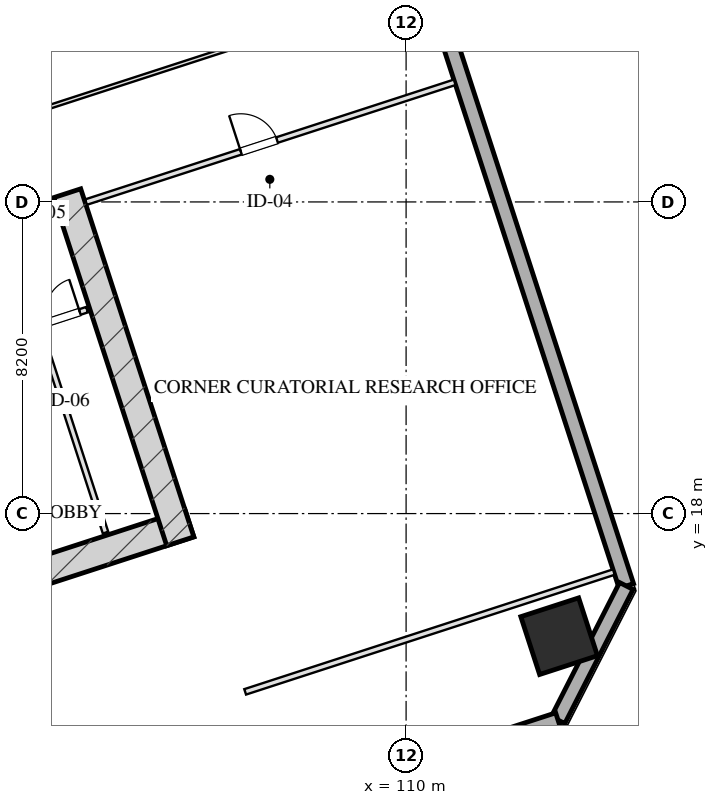
"""IFC4 building model, lengths in metres.
Left out: names, types, materials, properties, quantities, classifications, styles, units other than length and angle.
Written with IfcOpenShell. Run it as: python <this file> out.ifc"""

import sys

from ifc_helpers import new_model, si_unit, direction, frame, frame_2d, origin, origin_2d, place, context, subcontext, project, spatial, rectangle, hollow_rectangle, extrude, element, fill, save


model = new_model("IFC4")
c1 = context("Model", 3, precision=1e-05, world=origin(), true_north=direction((0.0, 1.0)))
c2 = subcontext(c1, "Body", "Model", "MODEL_VIEW")
j1 = project(units=[si_unit("LENGTHUNIT", "METRE"), si_unit("PLANEANGLEUNIT", "RADIAN")], contexts=[c1])
p1 = place(None, origin())
s1 = spatial("IfcSite", under=j1, at=p1, CompositionType="ELEMENT")
p2 = place(p1, origin())
s2 = spatial("IfcBuilding", under=s1, at=p2, CompositionType="ELEMENT")
p3 = place(p2, frame((0.0, 0.0, 38.0)))
s3 = spatial("IfcBuildingStorey", under=s2, at=p3, CompositionType="ELEMENT", Elevation=38.0)
p4 = place(p3, frame((88.559, 12.629, 0.0), z_axis=(0.0, 0.0, 1.0), x_axis=(0.951056072937, 0.309018358888, 0.0)))
e1 = element("IfcWall", 1, at=p4, inside=s3, PredefinedType="SHEAR", context=c2, shape_type="SweptSolid", body=[
    extrude(rectangle(XDim=16.55, YDim=0.75, at=frame_2d((8.275, 0.0))), origin(), (0.0, 0.0, 1.0), 4.0),
])
p5 = place(p3, frame((101.082, 26.429, 0.0), z_axis=(0.0, 0.0, 1.0), x_axis=(0.309016134813, -0.951056795583, 0.0)))
e2 = element("IfcWall", 2, at=p5, inside=s3, PredefinedType="SHEAR", context=c2, shape_type="SweptSolid", body=[
    extrude(rectangle(XDim=9.63, YDim=0.75, at=frame_2d((4.815, 0.0))), origin(), (0.0, 0.0, 1.0), 4.0),
])
p6 = place(p3, frame((114.027, 14.774, 0.0), z_axis=(0.0, 0.0, 1.0), x_axis=(0.951056516295, 0.309016994375, 0.0)))
e3 = element("IfcColumn", 3, at=p6, inside=s3, PredefinedType="COLUMN", context=c2, shape_type="SweptSolid", body=[
    extrude(hollow_rectangle(XDim=1.6, YDim=1.6, WallThickness=0.055, at=origin_2d()), origin(), (0.0, 0.0, 1.0), 4.001),
])
p7 = place(p3, frame((100.345, 63.648, 0.0), z_axis=(0.0, 0.0, 1.0), x_axis=(0.309014526607, -0.951057318118, 0.0)))
e4 = element("IfcWall", 4, at=p7, inside=s3, PredefinedType="SOLIDWALL", context=c2, shape_type="SweptSolid", body=[
    extrude(rectangle(XDim=50.0, YDim=0.4, at=frame_2d((25.0, 0.0))), origin(), (0.0, 0.0, 1.0), 3.16),
])
p8 = place(p7, frame((17.35, 0.0, 0.75)))
e5 = element("IfcOpeningElement", 5, at=p8, cuts=e4, PredefinedType="OPENING", context=c2, shape_type="SweptSolid", body=[
    extrude(rectangle(XDim=2.5, YDim=1.75, at=frame_2d((1.25, 0.875))), frame((0.0, 0.21, 0.0), z_axis=(0.0, -1.0, 0.0), x_axis=(1.0, 0.0, 0.0)), (0.0, 0.0, 1.0), 0.42),
])
p9 = place(p7, frame((30.25, 0.0, 0.0)))
e6 = element("IfcOpeningElement", 6, at=p9, cuts=e4, PredefinedType="OPENING", context=c2, shape_type="SweptSolid", body=[
    extrude(rectangle(XDim=1.1, YDim=2.15, at=frame_2d((0.55, 1.075))), frame((0.0, 0.21, 0.0), z_axis=(0.0, -1.0, 0.0), x_axis=(1.0, 0.0, 0.0)), (0.0, 0.0, 1.0), 0.42),
])
p10 = place(p3, frame((115.795, 16.095, 0.0), z_axis=(0.0, 0.0, 1.0), x_axis=(-0.453958106755, -0.891023028497, 0.0)))
e7 = element("IfcWall", 7, at=p10, inside=s3, PredefinedType="SOLIDWALL", context=c2, shape_type="SweptSolid", body=[
    extrude(rectangle(XDim=3.96, YDim=0.4, at=frame_2d((1.98, 0.0))), origin(), (0.0, 0.0, 1.0), 3.16),
])
p11 = place(p3, frame((113.998, 12.567, 0.0), z_axis=(0.0, 0.0, 1.0), x_axis=(-0.951055939317, -0.309018770125, 0.0)))
e8 = element("IfcWall", 8, at=p11, inside=s3, PredefinedType="SOLIDWALL", context=c2, shape_type="SweptSolid", body=[
    extrude(rectangle(XDim=32.4, YDim=0.4, at=frame_2d((16.2, 0.0))), origin(), (0.0, 0.0, 1.0), 3.16),
])
p12 = place(p3, frame((97.727, 24.944, 0.0), z_axis=(0.0, 0.0, 1.0), x_axis=(0.951036872128, 0.309077446369, 0.0)))
e9 = element("IfcWall", 9, at=p12, inside=s3, PredefinedType="PARTITIONING", context=c2, shape_type="SweptSolid", body=[
    extrude(rectangle(XDim=3.2, YDim=0.15, at=frame_2d((1.6, 0.0))), origin(), (0.0, 0.0, 1.0), 3.725),
])
p13 = place(p12, frame((0.45, 0.0, 0.0)))
e10 = element("IfcOpeningElement", 10, at=p13, cuts=e9, PredefinedType="OPENING", context=c2, shape_type="SweptSolid", body=[
    extrude(rectangle(XDim=0.95, YDim=2.05, at=frame_2d((0.475, 1.025))), frame((0.0, 0.085, 0.0), z_axis=(0.0, -1.0, 0.0), x_axis=(1.0, 0.0, 0.0)), (0.0, 0.0, 1.0), 0.17),
])
p14 = place(p3, frame((98.561, 22.376, 0.0), z_axis=(0.0, 0.0, 1.0), x_axis=(0.95104415986, 0.309055020985, 0.0)))
e11 = element("IfcWall", 11, at=p14, inside=s3, PredefinedType="PARTITIONING", context=c2, shape_type="SweptSolid", body=[
    extrude(rectangle(XDim=3.2, YDim=0.15, at=frame_2d((1.6, 0.0))), origin(), (0.0, 0.0, 1.0), 3.725),
])
p15 = place(p14, frame((0.35, 0.0, 0.0)))
e12 = element("IfcOpeningElement", 12, at=p15, cuts=e11, PredefinedType="OPENING", context=c2, shape_type="SweptSolid", body=[
    extrude(rectangle(XDim=0.9, YDim=2.05, at=frame_2d((0.45, 1.025))), frame((0.0, 0.085, 0.0), z_axis=(0.0, -1.0, 0.0), x_axis=(1.0, 0.0, 0.0)), (0.0, 0.0, 1.0), 0.17),
])
p16 = place(p14, frame((2.1, 0.0, 0.0)))
e13 = element("IfcOpeningElement", 13, at=p16, cuts=e11, PredefinedType="OPENING", context=c2, shape_type="SweptSolid", body=[
    extrude(rectangle(XDim=0.9, YDim=2.05, at=frame_2d((0.45, 1.025))), frame((0.0, 0.085, 0.0), z_axis=(0.0, -1.0, 0.0), x_axis=(1.0, 0.0, 0.0)), (0.0, 0.0, 1.0), 0.17),
])
p17 = place(p3, frame((100.32, 22.948, 0.0), z_axis=(0.0, 0.0, 1.0), x_axis=(0.309035009867, -0.951050662518, 0.0)))
e14 = element("IfcWall", 14, at=p17, inside=s3, PredefinedType="PARTITIONING", context=c2, shape_type="SweptSolid", body=[
    extrude(rectangle(XDim=5.73, YDim=0.15, at=frame_2d((2.865, 0.0))), origin(), (0.0, 0.0, 1.0), 3.725),
])
p18 = place(p3, frame((105.765, 13.309, 0.0), z_axis=(0.0, 0.0, 1.0), x_axis=(0.951054294345, 0.309023832749, 0.0)))
e15 = element("IfcWall", 15, at=p18, inside=s3, PredefinedType="PARTITIONING", context=c2, shape_type="SweptSolid", body=[
    extrude(rectangle(XDim=10.2, YDim=0.15, at=frame_2d((5.1, 0.0))), origin(), (0.0, 0.0, 1.0), 3.725),
])
p19 = place(p3, frame((101.578, 26.196, 0.0), z_axis=(0.0, 0.0, 1.0), x_axis=(0.951059043131, 0.309009217467, 0.0)))
e16 = element("IfcWall", 16, at=p19, inside=s3, PredefinedType="PARTITIONING", context=c2, shape_type="SweptSolid", body=[
    extrude(rectangle(XDim=10.2, YDim=0.15, at=frame_2d((5.1, 0.0))), origin(), (0.0, 0.0, 1.0), 3.725),
])
p20 = place(p19, frame((4.284, 0.0, 0.0)))
e17 = element("IfcOpeningElement", 17, at=p20, cuts=e16, PredefinedType="OPENING", context=c2, shape_type="SweptSolid", body=[
    extrude(rectangle(XDim=1.0, YDim=2.05, at=frame_2d((0.5, 1.025))), frame((0.0, 0.085, 0.0), z_axis=(0.0, -1.0, 0.0), x_axis=(1.0, 0.0, 0.0)), (0.0, 0.0, 1.0), 0.17),
])
p21 = place(p3, frame((96.304, 27.3, 0.0), z_axis=(0.0, 0.0, 1.0), x_axis=(0.951055535739, 0.309020012199, 0.0)))
e18 = element("IfcWall", 18, at=p21, inside=s3, PredefinedType="MOVABLE", context=c2, shape_type="SweptSolid", body=[
    extrude(rectangle(XDim=14.875, YDim=0.1, at=frame_2d((7.438, 0.0))), origin(), (0.0, 0.0, 1.0), 3.725),
])
p22 = place(p16, origin())
e19 = element("IfcDoor", 19, at=p22, inside=s3, OperationType="SINGLE_SWING_RIGHT", PredefinedType="DOOR", context=c2, shape_type="SweptSolid", body=[
    extrude(rectangle(XDim=0.9, YDim=2.05, at=frame_2d((0.45, 1.025))), frame((0.0, 0.025, 0.0), z_axis=(0.0, -1.0, 0.0), x_axis=(1.0, 0.0, 0.0)), (0.0, 0.0, 1.0), 0.05),
])
fill(e13, e19)
p23 = place(p20, origin())
e20 = element("IfcDoor", 20, at=p23, inside=s3, OperationType="SINGLE_SWING_LEFT", PredefinedType="DOOR", context=c2, shape_type="SweptSolid", body=[
    extrude(rectangle(XDim=1.0, YDim=2.05, at=frame_2d((0.5, 1.025))), frame((0.0, 0.025, 0.0), z_axis=(0.0, -1.0, 0.0), x_axis=(1.0, 0.0, 0.0)), (0.0, 0.0, 1.0), 0.05),
])
fill(e17, e20)
save(model, sys.argv[1])
